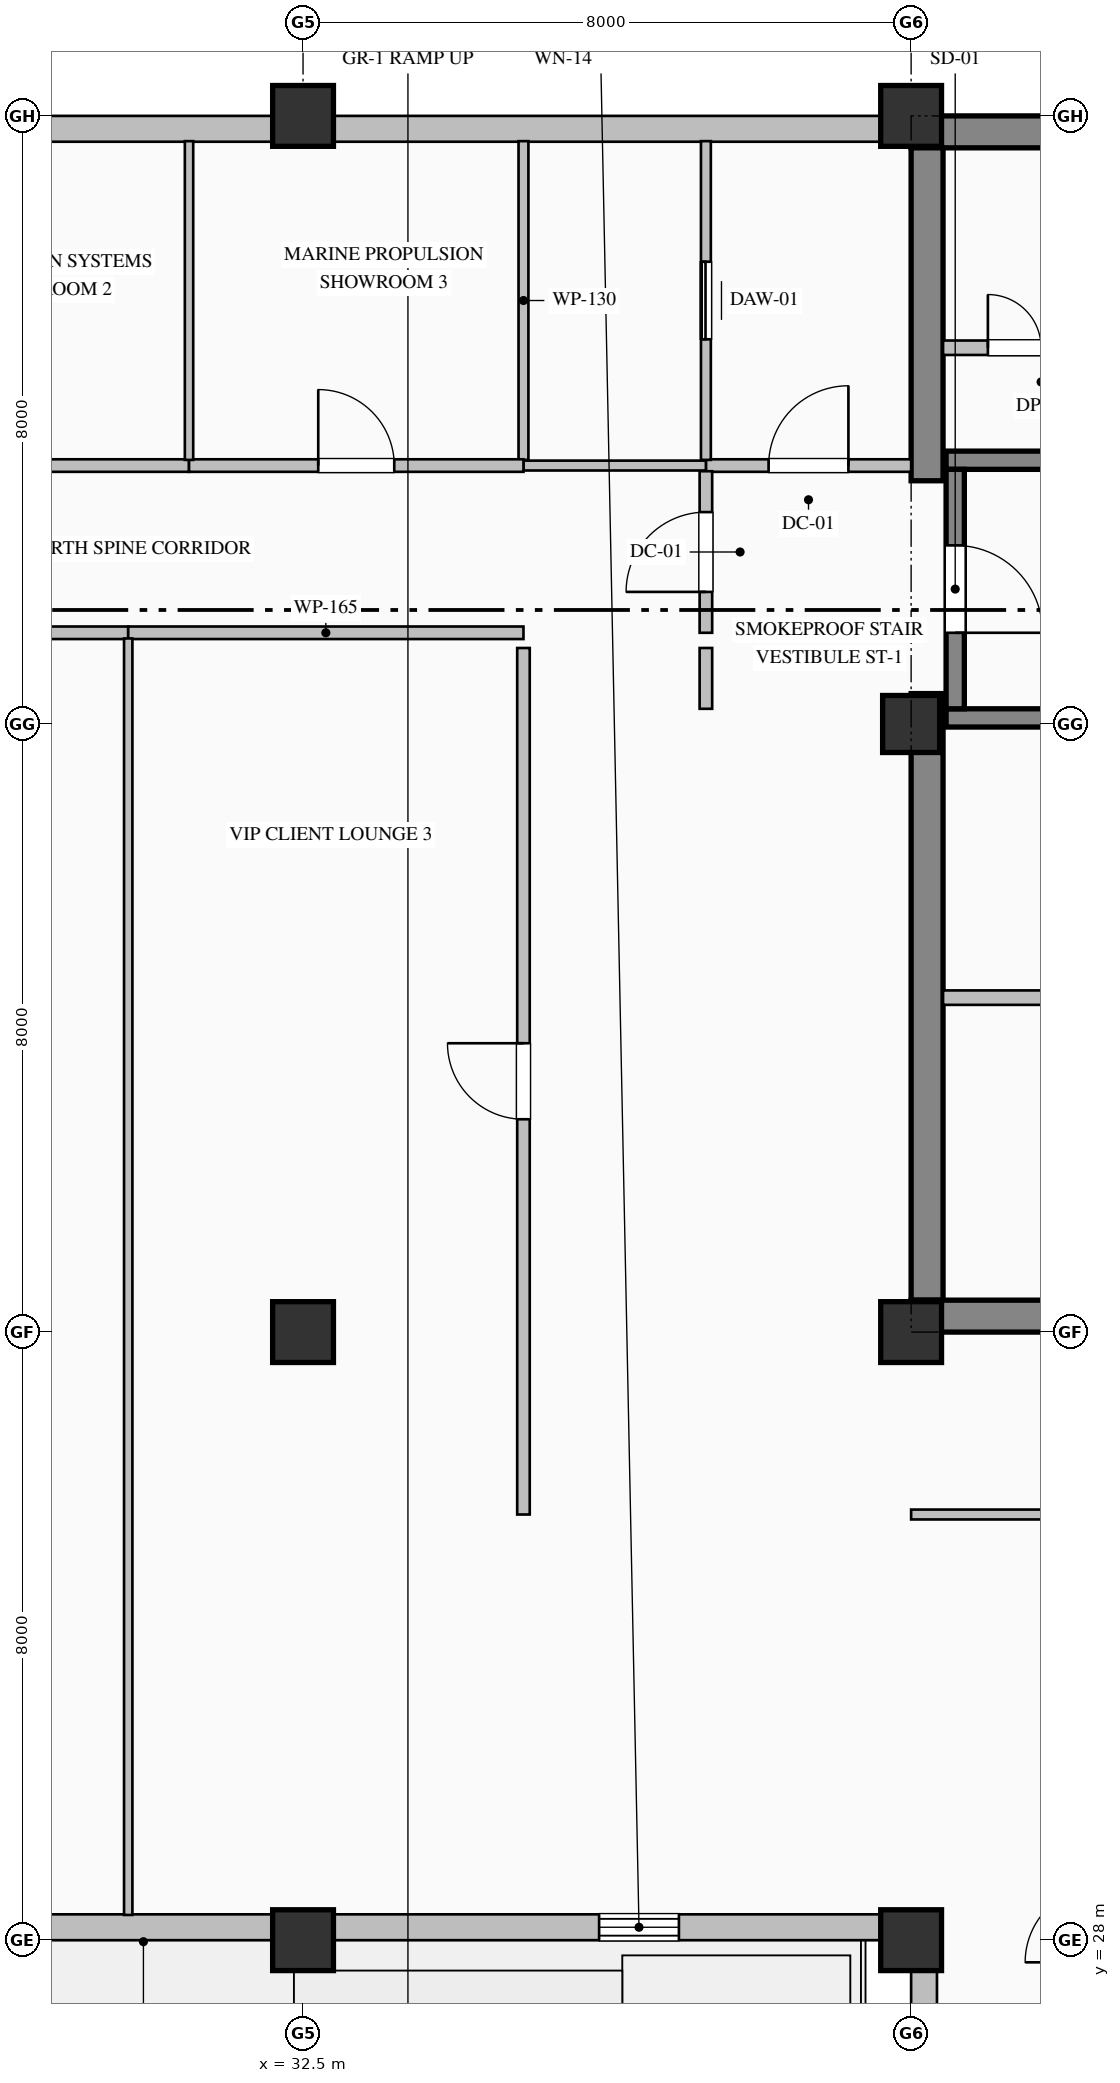
"""IFC4 building model, lengths in metres.
Left out: names, types, materials, properties, quantities, classifications, styles, units other than length and angle.
Written with IfcOpenShell. Run it as: python <this file> out.ifc"""

import sys

from ifc_helpers import new_model, si_unit, direction, frame, frame_2d, origin, origin_2d, place, context, subcontext, project, spatial, rectangle, hollow_rectangle, extrude, element, fill, save


model = new_model("IFC4")
c1 = context("Model", 3, precision=1e-05, world=origin(), true_north=direction((0.0, 1.0)))
c2 = subcontext(c1, "Body", "Model", "MODEL_VIEW")
j1 = project(units=[si_unit("LENGTHUNIT", "METRE"), si_unit("PLANEANGLEUNIT", "RADIAN")], contexts=[c1])
p1 = place(None, origin())
s1 = spatial("IfcSite", under=j1, at=p1, CompositionType="ELEMENT")
p2 = place(p1, origin())
s2 = spatial("IfcBuilding", under=s1, at=p2, CompositionType="ELEMENT")
p3 = place(p2, frame((0.0, 0.0, 359.2)))
s3 = spatial("IfcBuildingStorey", under=s2, at=p3, CompositionType="ELEMENT", Elevation=359.2)
p4 = place(p3, frame((40.5, 51.79, 0.0), z_axis=(0.0, 0.0, 1.0), x_axis=(1.0, 0.0, 0.0)))
e1 = element("IfcWall", 1, at=p4, inside=s3, PredefinedType="SHEAR", context=c2, shape_type="SweptSolid", body=[
    extrude(rectangle(XDim=23.5, YDim=0.42, at=frame_2d((11.75, 0.0))), origin(), (0.0, 0.0, 1.0), 3.785),
])
p5 = place(p3, frame((40.71, 36.42, 0.0), z_axis=(0.0, 0.0, 1.0), x_axis=(0.0, 1.0, 0.0)))
e2 = element("IfcWall", 2, at=p5, inside=s3, PredefinedType="SHEAR", context=c2, shape_type="SweptSolid", body=[
    extrude(rectangle(XDim=7.98, YDim=0.42, at=frame_2d((3.99, 0.0))), origin(), (0.0, 0.0, 1.0), 3.785),
])
p6 = place(p3, frame((40.71, 47.2, 0.0), z_axis=(0.0, 0.0, 1.0), x_axis=(0.0, 1.0, 0.0)))
e3 = element("IfcWall", 3, at=p6, inside=s3, PredefinedType="SHEAR", context=c2, shape_type="SweptSolid", body=[
    extrude(rectangle(XDim=4.38, YDim=0.42, at=frame_2d((2.19, 0.0))), origin(), (0.0, 0.0, 1.0), 3.785),
])
p7 = place(p3, frame((40.5, 36.21, 0.0), z_axis=(0.0, 0.0, 1.0), x_axis=(1.0, 0.0, 0.0)))
e4 = element("IfcWall", 4, at=p7, inside=s3, PredefinedType="SHEAR", context=c2, shape_type="SweptSolid", body=[
    extrude(rectangle(XDim=9.1, YDim=0.42, at=frame_2d((4.55, 0.0))), origin(), (0.0, 0.0, 1.0), 3.785),
])
for number, where, z_axis, x_axis in (
    (5, (32.5, 28.0, 0.0), (0.0, 0.0, 1.0), (1.0, 0.0, 0.0)),
    (6, (32.5, 36.0, 0.0), (0.0, 0.0, 1.0), (1.0, 0.0, 0.0)),
    (7, (32.5, 52.0, 0.0), (0.0, 0.0, 1.0), (1.0, 0.0, 0.0)),
    (8, (40.5, 28.0, 0.0), (0.0, 0.0, 1.0), (1.0, 0.0, 0.0)),
    (9, (40.5, 36.0, 0.0), (0.0, 0.0, 1.0), (1.0, 0.0, 0.0)),
):
    element("IfcColumn", number, at=place(p3, frame(where, z_axis=z_axis, x_axis=x_axis)), inside=s3, PredefinedType="COLUMN", context=c2, shape_type="SweptSolid", body=[
        extrude(hollow_rectangle(XDim=0.8, YDim=0.8, WallThickness=0.032, at=origin_2d()), origin(), (0.0, 0.0, 1.0), 4.0),
    ])
p8 = place(p3, frame((40.5, 44.0, 0.0), z_axis=(0.0, 0.0, 1.0), x_axis=(1.0, 0.0, 0.0)))
e10 = element("IfcColumn", 10, at=p8, inside=s3, PredefinedType="COLUMN", context=c2, shape_type="SweptSolid", body=[
    extrude(rectangle(XDim=0.75, YDim=0.75, at=origin_2d()), origin(), (0.0, 0.0, 1.0), 4.0),
])
p9 = place(p3, frame((40.5, 52.0, 0.0), z_axis=(0.0, 0.0, 1.0), x_axis=(1.0, 0.0, 0.0)))
e11 = element("IfcColumn", 11, at=p9, inside=s3, PredefinedType="COLUMN", context=c2, shape_type="SweptSolid", body=[
    extrude(hollow_rectangle(XDim=0.8, YDim=0.8, WallThickness=0.032, at=origin_2d()), origin(), (0.0, 0.0, 1.0), 4.0),
])
p10 = place(p3, frame((40.67, 22.5, 0.0), z_axis=(0.0, 0.0, 1.0), x_axis=(0.0, 1.0, 0.0)))
e12 = element("IfcWall", 12, at=p10, inside=s3, PredefinedType="SOLIDWALL", context=c2, shape_type="SweptSolid", body=[
    extrude(rectangle(XDim=5.84, YDim=0.34, at=frame_2d((2.92, 0.0))), origin(), (0.0, 0.0, 1.0), 3.185),
])
p11 = place(p3, frame((40.52, 28.17, 0.0), z_axis=(0.0, 0.0, 1.0), x_axis=(-1.0, 0.0, 0.0)))
e13 = element("IfcWall", 13, at=p11, inside=s3, PredefinedType="SOLIDWALL", context=c2, shape_type="SweptSolid", body=[
    extrude(rectangle(XDim=20.02, YDim=0.34, at=frame_2d((10.01, 0.0))), origin(), (0.0, 0.0, 1.0), 3.185),
])
p12 = place(p11, frame((3.075, 0.0, 0.8)))
e14 = element("IfcOpeningElement", 14, at=p12, cuts=e13, PredefinedType="OPENING", context=c2, shape_type="SweptSolid", body=[
    extrude(rectangle(XDim=1.05, YDim=2.15, at=frame_2d((0.525, 1.075))), frame((0.0, 0.18, 0.0), z_axis=(0.0, -1.0, 0.0), x_axis=(1.0, 0.0, 0.0)), (0.0, 0.0, 1.0), 0.36),
])
p13 = place(p11, frame((13.875, 0.0, 0.8)))
e15 = element("IfcOpeningElement", 15, at=p13, cuts=e13, PredefinedType="OPENING", context=c2, shape_type="SweptSolid", body=[
    extrude(rectangle(XDim=1.05, YDim=2.15, at=frame_2d((0.525, 1.075))), frame((0.0, 0.18, 0.0), z_axis=(0.0, -1.0, 0.0), x_axis=(1.0, 0.0, 0.0)), (0.0, 0.0, 1.0), 0.36),
])
p14 = place(p11, frame((11.395, 0.0, 0.0)))
e16 = element("IfcOpeningElement", 16, at=p14, cuts=e13, PredefinedType="OPENING", context=c2, shape_type="SweptSolid", body=[
    extrude(rectangle(XDim=1.25, YDim=2.25, at=frame_2d((0.625, 1.125))), frame((0.0, 0.18, 0.0), z_axis=(0.0, -1.0, 0.0), x_axis=(1.0, 0.0, 0.0)), (0.0, 0.0, 1.0), 0.36),
])
p15 = place(p3, frame((20.5, 51.83, 0.0), z_axis=(0.0, 0.0, 1.0), x_axis=(1.0, 0.0, 0.0)))
e17 = element("IfcWall", 17, at=p15, inside=s3, PredefinedType="SOLIDWALL", context=c2, shape_type="SweptSolid", body=[
    extrude(rectangle(XDim=20.02, YDim=0.34, at=frame_2d((10.01, 0.0))), origin(), (0.0, 0.0, 1.0), 3.335),
])
p16 = place(p15, frame((6.725, 0.0, 0.9)))
e18 = element("IfcOpeningElement", 18, at=p16, cuts=e17, PredefinedType="OPENING", context=c2, shape_type="SweptSolid", body=[
    extrude(rectangle(XDim=0.95, YDim=1.85, at=frame_2d((0.475, 0.925))), frame((0.0, 0.18, 0.0), z_axis=(0.0, -1.0, 0.0), x_axis=(1.0, 0.0, 0.0)), (0.0, 0.0, 1.0), 0.36),
])
for number, where, z_axis, x_axis in (
    (19, (40.96, 47.47, 0.0), (0.0, 0.0, 1.0), (1.0, 0.0, 0.0)),
    (20, (49.04, 44.08, 0.0), (0.0, 0.0, 1.0), (-1.0, 0.0, 0.0)),
):
    element("IfcWall", number, at=place(p3, frame(where, z_axis=z_axis, x_axis=x_axis)), inside=s3, PredefinedType="SOLIDWALL", context=c2, shape_type="SweptSolid", body=[
        extrude(rectangle(XDim=8.08, YDim=0.24, at=frame_2d((4.04, 0.0))), origin(), (0.0, 0.0, 1.0), 4.0),
    ])
p17 = place(p3, frame((41.08, 47.35, 0.0), z_axis=(0.0, 0.0, 1.0), x_axis=(0.0, -1.0, 0.0)))
e21 = element("IfcWall", 21, at=p17, inside=s3, PredefinedType="SOLIDWALL", context=c2, shape_type="SweptSolid", body=[
    extrude(rectangle(XDim=3.15, YDim=0.24, at=frame_2d((1.575, 0.0))), origin(), (0.0, 0.0, 1.0), 4.0),
])
p18 = place(p17, frame((1.0, 0.0, 0.0)))
e22 = element("IfcOpeningElement", 22, at=p18, cuts=e21, PredefinedType="OPENING", context=c2, shape_type="SweptSolid", body=[
    extrude(rectangle(XDim=1.15, YDim=2.2, at=frame_2d((0.575, 1.1))), frame((0.0, 0.13, 0.0), z_axis=(0.0, -1.0, 0.0), x_axis=(1.0, 0.0, 0.0)), (0.0, 0.0, 1.0), 0.26),
])
p19 = place(p3, frame((37.8, 47.4, 0.0), z_axis=(0.0, 0.0, 1.0), x_axis=(1.0, 0.0, 0.0)))
e23 = element("IfcWall", 23, at=p19, inside=s3, PredefinedType="PARTITIONING", context=c2, shape_type="SweptSolid", body=[
    extrude(rectangle(XDim=2.7, YDim=0.165, at=frame_2d((1.35, 0.0))), origin(), (0.0, 0.0, 1.0), 3.785),
])
p20 = place(p19, frame((0.825, 0.0, 0.0)))
e24 = element("IfcOpeningElement", 24, at=p20, cuts=e23, PredefinedType="OPENING", context=c2, shape_type="SweptSolid", body=[
    extrude(rectangle(XDim=1.05, YDim=2.15, at=frame_2d((0.525, 1.075))), frame((0.0, 0.093, 0.0), z_axis=(0.0, -1.0, 0.0), x_axis=(1.0, 0.0, 0.0)), (0.0, 0.0, 1.0), 0.185),
])
p21 = place(p3, frame((37.8, 45.2, 0.0), z_axis=(0.0, 0.0, 1.0), x_axis=(0.0, 1.0, 0.0)))
e25 = element("IfcWall", 25, at=p21, inside=s3, PredefinedType="PARTITIONING", context=c2, shape_type="SweptSolid", body=[
    extrude(rectangle(XDim=2.125, YDim=0.165, at=frame_2d((1.063, 0.0))), origin(), (0.0, 0.0, 1.0), 3.785),
])
p22 = place(p21, frame((0.538, 0.0, 0.0)))
e26 = element("IfcOpeningElement", 26, at=p22, cuts=e25, PredefinedType="OPENING", context=c2, shape_type="SweptSolid", body=[
    extrude(rectangle(XDim=1.05, YDim=2.15, at=frame_2d((0.525, 1.075))), frame((0.0, 0.093, 0.0), z_axis=(0.0, -1.0, 0.0), x_axis=(1.0, 0.0, 0.0)), (0.0, 0.0, 1.0), 0.185),
])
p23 = place(p3, frame((37.8, 44.2, 0.0), z_axis=(0.0, 0.0, 1.0), x_axis=(0.0, 1.0, 0.0)))
e27 = element("IfcWall", 27, at=p23, inside=s3, PredefinedType="PARTITIONING", context=c2, shape_type="SweptSolid", body=[
    extrude(rectangle(XDim=0.8, YDim=0.165, at=frame_2d((0.4, 0.0))), origin(), (0.0, 0.0, 1.0), 3.785),
])
p24 = place(p3, frame((37.8, 47.475, 0.0), z_axis=(0.0, 0.0, 1.0), x_axis=(0.0, 1.0, 0.0)))
e28 = element("IfcWall", 28, at=p24, inside=s3, PredefinedType="PARTITIONING", context=c2, shape_type="SweptSolid", body=[
    extrude(rectangle(XDim=4.193, YDim=0.13, at=frame_2d((2.097, 0.0))), origin(), (0.0, 0.0, 1.0), 3.785),
])
p25 = place(p24, frame((1.587, 0.0, 0.0)))
e29 = element("IfcOpeningElement", 29, at=p25, cuts=e28, PredefinedType="OPENING", context=c2, shape_type="SweptSolid", body=[
    extrude(rectangle(XDim=1.02, YDim=2.15, at=frame_2d((0.51, 1.075))), frame((0.0, 0.075, 0.0), z_axis=(0.0, -1.0, 0.0), x_axis=(1.0, 0.0, 0.0)), (0.0, 0.0, 1.0), 0.15),
])
p26 = place(p3, frame((37.8, 47.4, 0.0), z_axis=(0.0, 0.0, 1.0), x_axis=(-1.0, 0.0, 0.0)))
e30 = element("IfcWall", 30, at=p26, inside=s3, PredefinedType="PARTITIONING", context=c2, shape_type="SweptSolid", body=[
    extrude(rectangle(XDim=2.4, YDim=0.13, at=frame_2d((1.2, 0.0))), origin(), (0.0, 0.0, 1.0), 3.785),
])
p27 = place(p3, frame((35.4, 47.475, 0.0), z_axis=(0.0, 0.0, 1.0), x_axis=(0.0, 1.0, 0.0)))
e31 = element("IfcWall", 31, at=p27, inside=s3, PredefinedType="PARTITIONING", context=c2, shape_type="SweptSolid", body=[
    extrude(rectangle(XDim=4.193, YDim=0.13, at=frame_2d((2.097, 0.0))), origin(), (0.0, 0.0, 1.0), 3.785),
])
p28 = place(p3, frame((40.92, 48.95, 0.0), z_axis=(0.0, 0.0, 1.0), x_axis=(1.0, 0.0, 0.0)))
e32 = element("IfcWall", 32, at=p28, inside=s3, PredefinedType="PARTITIONING", context=c2, shape_type="SweptSolid", body=[
    extrude(rectangle(XDim=2.58, YDim=0.19, at=frame_2d((1.29, 0.0))), origin(), (0.0, 0.0, 1.0), 3.785),
])
p29 = place(p28, frame((0.59, 0.0, 0.0)))
e33 = element("IfcOpeningElement", 33, at=p29, cuts=e32, PredefinedType="OPENING", context=c2, shape_type="SweptSolid", body=[
    extrude(rectangle(XDim=1.4, YDim=2.25, at=frame_2d((0.7, 1.125))), frame((0.0, 0.105, 0.0), z_axis=(0.0, -1.0, 0.0), x_axis=(1.0, 0.0, 0.0)), (0.0, 0.0, 1.0), 0.21),
])
p30 = place(p3, frame((40.92, 40.4, 0.0), z_axis=(0.0, 0.0, 1.0), x_axis=(1.0, 0.0, 0.0)))
e34 = element("IfcWall", 34, at=p30, inside=s3, PredefinedType="PARTITIONING", context=c2, shape_type="SweptSolid", body=[
    extrude(rectangle(XDim=8.48, YDim=0.19, at=frame_2d((4.24, 0.0))), origin(), (0.0, 0.0, 1.0), 3.785),
])
p31 = place(p3, frame((24.5, 47.4, 0.0), z_axis=(0.0, 0.0, 1.0), x_axis=(1.0, 0.0, 0.0)))
e35 = element("IfcWall", 35, at=p31, inside=s3, PredefinedType="PARTITIONING", context=c2, shape_type="SweptSolid", body=[
    extrude(rectangle(XDim=6.5, YDim=0.165, at=frame_2d((3.25, 0.0))), origin(), (0.0, 0.0, 1.0), 3.785),
])
p32 = place(p31, frame((2.75, 0.0, 0.0)))
e36 = element("IfcOpeningElement", 36, at=p32, cuts=e35, PredefinedType="OPENING", context=c2, shape_type="SweptSolid", body=[
    extrude(rectangle(XDim=1.0, YDim=2.15, at=frame_2d((0.5, 1.075))), frame((0.0, 0.093, 0.0), z_axis=(0.0, -1.0, 0.0), x_axis=(1.0, 0.0, 0.0)), (0.0, 0.0, 1.0), 0.185),
])
p33 = place(p3, frame((31.0, 47.4, 0.0), z_axis=(0.0, 0.0, 1.0), x_axis=(1.0, 0.0, 0.0)))
e37 = element("IfcWall", 37, at=p33, inside=s3, PredefinedType="PARTITIONING", context=c2, shape_type="SweptSolid", body=[
    extrude(rectangle(XDim=4.4, YDim=0.165, at=frame_2d((2.2, 0.0))), origin(), (0.0, 0.0, 1.0), 3.785),
])
p34 = place(p33, frame((1.7, 0.0, 0.0)))
e38 = element("IfcOpeningElement", 38, at=p34, cuts=e37, PredefinedType="OPENING", context=c2, shape_type="SweptSolid", body=[
    extrude(rectangle(XDim=1.0, YDim=2.15, at=frame_2d((0.5, 1.075))), frame((0.0, 0.093, 0.0), z_axis=(0.0, -1.0, 0.0), x_axis=(1.0, 0.0, 0.0)), (0.0, 0.0, 1.0), 0.185),
])
p35 = place(p3, frame((30.2, 45.2, 0.0), z_axis=(0.0, 0.0, 1.0), x_axis=(-1.0, 0.0, 0.0)))
e39 = element("IfcWall", 39, at=p35, inside=s3, PredefinedType="PARTITIONING", context=c2, shape_type="SweptSolid", body=[
    extrude(rectangle(XDim=7.2, YDim=0.165, at=frame_2d((3.6, 0.0))), origin(), (0.0, 0.0, 1.0), 3.785),
])
p36 = place(p35, frame((3.1, 0.0, 0.0)))
e40 = element("IfcOpeningElement", 40, at=p36, cuts=e39, PredefinedType="OPENING", context=c2, shape_type="SweptSolid", body=[
    extrude(rectangle(XDim=1.0, YDim=2.15, at=frame_2d((0.5, 1.075))), frame((0.0, 0.093, 0.0), z_axis=(0.0, -1.0, 0.0), x_axis=(1.0, 0.0, 0.0)), (0.0, 0.0, 1.0), 0.185),
])
p37 = place(p3, frame((35.4, 45.2, 0.0), z_axis=(0.0, 0.0, 1.0), x_axis=(-1.0, 0.0, 0.0)))
e41 = element("IfcWall", 41, at=p37, inside=s3, PredefinedType="PARTITIONING", context=c2, shape_type="SweptSolid", body=[
    extrude(rectangle(XDim=5.2, YDim=0.165, at=frame_2d((2.6, 0.0))), origin(), (0.0, 0.0, 1.0), 3.785),
])
p38 = place(p3, frame((35.4, 33.6, 0.0), z_axis=(0.0, 0.0, 1.0), x_axis=(0.0, 1.0, 0.0)))
e42 = element("IfcWall", 42, at=p38, inside=s3, PredefinedType="PARTITIONING", context=c2, shape_type="SweptSolid", body=[
    extrude(rectangle(XDim=11.4, YDim=0.165, at=frame_2d((5.7, 0.0))), origin(), (0.0, 0.0, 1.0), 3.785),
])
p39 = place(p38, frame((5.2, 0.0, 0.0)))
e43 = element("IfcOpeningElement", 43, at=p39, cuts=e42, PredefinedType="OPENING", context=c2, shape_type="SweptSolid", body=[
    extrude(rectangle(XDim=1.0, YDim=2.15, at=frame_2d((0.5, 1.075))), frame((0.0, 0.093, 0.0), z_axis=(0.0, -1.0, 0.0), x_axis=(1.0, 0.0, 0.0)), (0.0, 0.0, 1.0), 0.185),
])
p40 = place(p3, frame((43.0, 33.6, 0.0), z_axis=(0.0, 0.0, 1.0), x_axis=(-1.0, 0.0, 0.0)))
e44 = element("IfcWall", 44, at=p40, inside=s3, PredefinedType="PARTITIONING", context=c2, shape_type="SweptSolid", body=[
    extrude(rectangle(XDim=2.5, YDim=0.13, at=frame_2d((1.25, 0.0))), origin(), (0.0, 0.0, 1.0), 3.785),
])
p41 = place(p3, frame((31.0, 51.668, 0.0), z_axis=(0.0, 0.0, 1.0), x_axis=(0.0, -1.0, 0.0)))
e45 = element("IfcWall", 45, at=p41, inside=s3, PredefinedType="MOVABLE", context=c2, shape_type="SweptSolid", body=[
    extrude(rectangle(XDim=4.193, YDim=0.11, at=frame_2d((2.097, 0.0))), origin(), (0.0, 0.0, 1.0), 3.785),
])
p42 = place(p3, frame((30.2, 45.125, 0.0), z_axis=(0.0, 0.0, 1.0), x_axis=(0.0, -1.0, 0.0)))
e46 = element("IfcWall", 46, at=p42, inside=s3, PredefinedType="MOVABLE", context=c2, shape_type="SweptSolid", body=[
    extrude(rectangle(XDim=16.793, YDim=0.11, at=frame_2d((8.397, 0.0))), origin(), (0.0, 0.0, 1.0), 3.785),
])
p43 = place(p12, origin())
e47 = element("IfcWindow", 47, at=p43, inside=s3, PartitioningType="SINGLE_PANEL", PredefinedType="WINDOW", context=c2, shape_type="SweptSolid", body=[
    extrude(rectangle(XDim=1.05, YDim=2.15, at=frame_2d((0.525, 1.075))), frame((0.0, 0.15, 0.0), z_axis=(0.0, -1.0, 0.0), x_axis=(1.0, 0.0, 0.0)), (0.0, 0.0, 1.0), 0.06),
])
fill(e14, e47)
p44 = place(p18, origin())
e48 = element("IfcDoor", 48, at=p44, inside=s3, OperationType="SINGLE_SWING_RIGHT", PredefinedType="DOOR", context=c2, shape_type="SweptSolid", body=[
    extrude(rectangle(XDim=1.15, YDim=2.2, at=frame_2d((0.575, 1.1))), frame((0.0, 0.025, 0.0), z_axis=(0.0, -1.0, 0.0), x_axis=(1.0, 0.0, 0.0)), (0.0, 0.0, 1.0), 0.05),
])
fill(e22, e48)
p45 = place(p20, origin())
e49 = element("IfcDoor", 49, at=p45, inside=s3, OperationType="SINGLE_SWING_RIGHT", PredefinedType="DOOR", context=c2, shape_type="SweptSolid", body=[
    extrude(rectangle(XDim=1.05, YDim=2.15, at=frame_2d((0.525, 1.075))), frame((0.0, 0.025, 0.0), z_axis=(0.0, -1.0, 0.0), x_axis=(1.0, 0.0, 0.0)), (0.0, 0.0, 1.0), 0.05),
])
fill(e24, e49)
p46 = place(p22, origin())
e50 = element("IfcDoor", 50, at=p46, inside=s3, OperationType="SINGLE_SWING_LEFT", PredefinedType="DOOR", context=c2, shape_type="SweptSolid", body=[
    extrude(rectangle(XDim=1.05, YDim=2.15, at=frame_2d((0.525, 1.075))), frame((0.0, 0.025, 0.0), z_axis=(0.0, -1.0, 0.0), x_axis=(1.0, 0.0, 0.0)), (0.0, 0.0, 1.0), 0.05),
])
fill(e26, e50)
p47 = place(p25, origin())
e51 = element("IfcDoor", 51, at=p47, inside=s3, OperationType="SLIDING_TO_LEFT", PredefinedType="DOOR", context=c2, shape_type="SweptSolid", body=[
    extrude(rectangle(XDim=1.02, YDim=2.15, at=frame_2d((0.51, 1.075))), frame((0.0, 0.025, 0.0), z_axis=(0.0, -1.0, 0.0), x_axis=(1.0, 0.0, 0.0)), (0.0, 0.0, 1.0), 0.05),
])
fill(e29, e51)
p48 = place(p29, origin())
e52 = element("IfcDoor", 52, at=p48, inside=s3, OperationType="DOUBLE_DOOR_SINGLE_SWING", PredefinedType="DOOR", context=c2, shape_type="SweptSolid", body=[
    extrude(rectangle(XDim=1.4, YDim=2.25, at=frame_2d((0.7, 1.125))), frame((0.0, 0.025, 0.0), z_axis=(0.0, -1.0, 0.0), x_axis=(1.0, 0.0, 0.0)), (0.0, 0.0, 1.0), 0.05),
])
fill(e33, e52)
p49 = place(p34, origin())
e53 = element("IfcDoor", 53, at=p49, inside=s3, OperationType="SINGLE_SWING_LEFT", PredefinedType="DOOR", context=c2, shape_type="SweptSolid", body=[
    extrude(rectangle(XDim=1.0, YDim=2.15, at=frame_2d((0.5, 1.075))), frame((0.0, 0.025, 0.0), z_axis=(0.0, -1.0, 0.0), x_axis=(1.0, 0.0, 0.0)), (0.0, 0.0, 1.0), 0.05),
])
fill(e38, e53)
p50 = place(p39, origin())
e54 = element("IfcDoor", 54, at=p50, inside=s3, OperationType="SINGLE_SWING_RIGHT", PredefinedType="DOOR", context=c2, shape_type="SweptSolid", body=[
    extrude(rectangle(XDim=1.0, YDim=2.15, at=frame_2d((0.5, 1.075))), frame((0.0, 0.025, 0.0), z_axis=(0.0, -1.0, 0.0), x_axis=(1.0, 0.0, 0.0)), (0.0, 0.0, 1.0), 0.05),
])
fill(e43, e54)
save(model, sys.argv[1])
